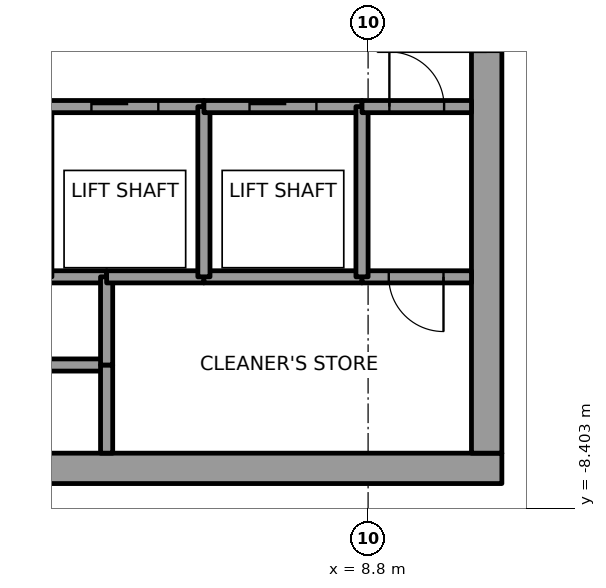
"""IFC4 building model, lengths in metres.
Left out: names, types, materials, properties, quantities, classifications, styles, units other than length and angle.
Written with IfcOpenShell. Run it as: python <this file> out.ifc"""

import sys

from ifc_helpers import new_model, si_unit, direction, frame, frame_2d, origin, place, context, subcontext, project, spatial, rectangle, extrude, element, fill, save


model = new_model("IFC4")
c1 = context("Model", 3, precision=1e-05, world=origin(), true_north=direction((0.0, 1.0)))
c2 = subcontext(c1, "Body", "Model", "MODEL_VIEW")
j1 = project(units=[si_unit("LENGTHUNIT", "METRE"), si_unit("PLANEANGLEUNIT", "RADIAN")], contexts=[c1])
p1 = place(None, origin())
s1 = spatial("IfcSite", under=j1, at=p1, CompositionType="ELEMENT")
p2 = place(p1, origin())
s2 = spatial("IfcBuilding", under=s1, at=p2, CompositionType="ELEMENT")
p3 = place(p2, frame((0.0, 0.0, 339.4)))
s3 = spatial("IfcBuildingStorey", under=s2, at=p3, CompositionType="ELEMENT", Elevation=339.4)
p4 = place(p3, frame((-11.0, -7.75, 0.0), z_axis=(0.0, 0.0, 1.0), x_axis=(1.0, 0.0, 0.0)))
e1 = element("IfcWall", 1, at=p4, inside=s3, PredefinedType="SHEAR", context=c2, shape_type="SweptSolid", body=[
    extrude(rectangle(XDim=22.0, YDim=0.5, at=frame_2d((11.0, 0.0))), origin(), (0.0, 0.0, 1.0), 5.4),
])
p5 = place(p4, frame((10.45, 0.0, 0.0)))
e2 = element("IfcOpeningElement", 2, at=p5, cuts=e1, PredefinedType="OPENING", context=c2, shape_type="SweptSolid", body=[
    extrude(rectangle(XDim=1.1, YDim=2.1, at=frame_2d((0.55, 1.05))), frame((0.0, 0.25, 0.0), z_axis=(0.0, -1.0, 0.0), x_axis=(1.0, 0.0, 0.0)), (0.0, 0.0, 1.0), 0.5),
])
p6 = place(p3, frame((10.75, -7.5, 0.0), z_axis=(0.0, 0.0, 1.0), x_axis=(0.0, 1.0, 0.0)))
e3 = element("IfcWall", 3, at=p6, inside=s3, PredefinedType="SHEAR", context=c2, shape_type="SweptSolid", body=[
    extrude(rectangle(XDim=15.0, YDim=0.5, at=frame_2d((7.5, 0.0))), origin(), (0.0, 0.0, 1.0), 5.4),
])
p7 = place(p6, frame((6.6, 0.0, 0.0)))
e4 = element("IfcOpeningElement", 4, at=p7, cuts=e3, PredefinedType="OPENING", context=c2, shape_type="SweptSolid", body=[
    extrude(rectangle(XDim=1.8, YDim=2.1, at=frame_2d((0.9, 1.05))), frame((0.0, 0.25, 0.0), z_axis=(0.0, -1.0, 0.0), x_axis=(1.0, 0.0, 0.0)), (0.0, 0.0, 1.0), 0.5),
])
p8 = place(p3, frame((4.5, -6.05, 0.0), z_axis=(0.0, 0.0, 1.0), x_axis=(-1.0, 0.0, 0.0)))
e5 = element("IfcWall", 5, at=p8, inside=s3, PredefinedType="SOLIDWALL", context=c2, shape_type="SweptSolid", body=[
    extrude(rectangle(XDim=3.6, YDim=0.2, at=frame_2d((1.8, 0.0))), origin(), (0.0, 0.0, 1.0), 5.25),
])
p9 = place(p3, frame((4.5, -4.6, 0.0), z_axis=(0.0, 0.0, 1.0), x_axis=(-1.0, 0.0, 0.0)))
e6 = element("IfcWall", 6, at=p9, inside=s3, PredefinedType="SOLIDWALL", context=c2, shape_type="SweptSolid", body=[
    extrude(rectangle(XDim=1.0, YDim=0.2, at=frame_2d((0.5, 0.0))), origin(), (0.0, 0.0, 1.0), 5.25),
])
p10 = place(p3, frame((3.5, -1.8, 0.0), z_axis=(0.0, 0.0, 1.0), x_axis=(1.0, 0.0, 0.0)))
e7 = element("IfcWall", 7, at=p10, inside=s3, PredefinedType="SOLIDWALL", context=c2, shape_type="SweptSolid", body=[
    extrude(rectangle(XDim=2.6, YDim=0.2, at=frame_2d((1.3, 0.0))), origin(), (0.0, 0.0, 1.0), 5.25),
])
p11 = place(p10, frame((0.75, 0.0, 0.0)))
e8 = element("IfcOpeningElement", 8, at=p11, cuts=e7, PredefinedType="OPENING", context=c2, shape_type="SweptSolid", body=[
    extrude(rectangle(XDim=1.1, YDim=2.1, at=frame_2d((0.55, 1.05))), frame((0.0, 0.1, 0.0), z_axis=(0.0, -1.0, 0.0), x_axis=(1.0, 0.0, 0.0)), (0.0, 0.0, 1.0), 0.2),
])
for number, where, z_axis, x_axis in (
    (9, (4.5, -6.05, 0.0), (0.0, 0.0, 1.0), (0.0, -1.0, 0.0)),
    (10, (4.5, -4.6, 0.0), (0.0, 0.0, 1.0), (0.0, -1.0, 0.0)),
):
    element("IfcWall", number, at=place(p3, frame(where, z_axis=z_axis, x_axis=x_axis)), inside=s3, PredefinedType="SOLIDWALL", context=c2, shape_type="SweptSolid", body=[
        extrude(rectangle(XDim=1.45, YDim=0.2, at=frame_2d((0.725, 0.0))), origin(), (0.0, 0.0, 1.0), 5.25),
    ])
p12 = place(p3, frame((6.1, -4.6, 0.0), z_axis=(0.0, 0.0, 1.0), x_axis=(-1.0, 0.0, 0.0)))
e11 = element("IfcWall", 11, at=p12, inside=s3, PredefinedType="SOLIDWALL", context=c2, shape_type="SweptSolid", body=[
    extrude(rectangle(XDim=1.6, YDim=0.2, at=frame_2d((0.8, 0.0))), origin(), (0.0, 0.0, 1.0), 5.25),
])
p13 = place(p3, frame((8.7, -4.6, 0.0), z_axis=(0.0, 0.0, 1.0), x_axis=(-1.0, 0.0, 0.0)))
e12 = element("IfcWall", 12, at=p13, inside=s3, PredefinedType="SOLIDWALL", context=c2, shape_type="SweptSolid", body=[
    extrude(rectangle(XDim=2.6, YDim=0.2, at=frame_2d((1.3, 0.0))), origin(), (0.0, 0.0, 1.0), 5.25),
])
p14 = place(p3, frame((6.1, -4.6, 0.0), z_axis=(0.0, 0.0, 1.0), x_axis=(0.0, 1.0, 0.0)))
e13 = element("IfcWall", 13, at=p14, inside=s3, PredefinedType="SOLIDWALL", context=c2, shape_type="SweptSolid", body=[
    extrude(rectangle(XDim=2.8, YDim=0.2, at=frame_2d((1.4, 0.0))), origin(), (0.0, 0.0, 1.0), 5.25),
])
p15 = place(p3, frame((6.1, -1.8, 0.0), z_axis=(0.0, 0.0, 1.0), x_axis=(1.0, 0.0, 0.0)))
e14 = element("IfcWall", 14, at=p15, inside=s3, PredefinedType="SOLIDWALL", context=c2, shape_type="SweptSolid", body=[
    extrude(rectangle(XDim=2.6, YDim=0.2, at=frame_2d((1.3, 0.0))), origin(), (0.0, 0.0, 1.0), 5.25),
])
p16 = place(p15, frame((0.75, 0.0, 0.0)))
e15 = element("IfcOpeningElement", 15, at=p16, cuts=e14, PredefinedType="OPENING", context=c2, shape_type="SweptSolid", body=[
    extrude(rectangle(XDim=1.1, YDim=2.1, at=frame_2d((0.55, 1.05))), frame((0.0, 0.1, 0.0), z_axis=(0.0, -1.0, 0.0), x_axis=(1.0, 0.0, 0.0)), (0.0, 0.0, 1.0), 0.2),
])
p17 = place(p3, frame((10.5, -4.6, 0.0), z_axis=(0.0, 0.0, 1.0), x_axis=(-1.0, 0.0, 0.0)))
e16 = element("IfcWall", 16, at=p17, inside=s3, PredefinedType="SOLIDWALL", context=c2, shape_type="SweptSolid", body=[
    extrude(rectangle(XDim=1.8, YDim=0.2, at=frame_2d((0.9, 0.0))), origin(), (0.0, 0.0, 1.0), 5.25),
])
p18 = place(p17, frame((0.46, 0.0, 0.0)))
e17 = element("IfcOpeningElement", 17, at=p18, cuts=e16, PredefinedType="OPENING", context=c2, shape_type="SweptSolid", body=[
    extrude(rectangle(XDim=0.9, YDim=2.1, at=frame_2d((0.45, 1.05))), frame((0.0, 0.1, 0.0), z_axis=(0.0, -1.0, 0.0), x_axis=(1.0, 0.0, 0.0)), (0.0, 0.0, 1.0), 0.2),
])
p19 = place(p3, frame((8.7, -1.8, 0.0), z_axis=(0.0, 0.0, 1.0), x_axis=(0.0, -1.0, 0.0)))
e18 = element("IfcWall", 18, at=p19, inside=s3, PredefinedType="SOLIDWALL", context=c2, shape_type="SweptSolid", body=[
    extrude(rectangle(XDim=2.8, YDim=0.2, at=frame_2d((1.4, 0.0))), origin(), (0.0, 0.0, 1.0), 5.25),
])
p20 = place(p3, frame((8.7, -1.8, 0.0), z_axis=(0.0, 0.0, 1.0), x_axis=(1.0, 0.0, 0.0)))
e19 = element("IfcWall", 19, at=p20, inside=s3, PredefinedType="SOLIDWALL", context=c2, shape_type="SweptSolid", body=[
    extrude(rectangle(XDim=1.8, YDim=0.2, at=frame_2d((0.9, 0.0))), origin(), (0.0, 0.0, 1.0), 5.25),
])
p21 = place(p20, frame((0.45, 0.0, 0.0)))
e20 = element("IfcOpeningElement", 20, at=p21, cuts=e19, PredefinedType="OPENING", context=c2, shape_type="SweptSolid", body=[
    extrude(rectangle(XDim=0.9, YDim=2.1, at=frame_2d((0.45, 1.05))), frame((0.0, 0.1, 0.0), z_axis=(0.0, -1.0, 0.0), x_axis=(1.0, 0.0, 0.0)), (0.0, 0.0, 1.0), 0.2),
])
p22 = place(p11, origin())
e21 = element("IfcDoor", 21, at=p22, inside=s3, OperationType="SLIDING_TO_RIGHT", PredefinedType="DOOR", context=c2, shape_type="SweptSolid", body=[
    extrude(rectangle(XDim=1.1, YDim=2.1, at=frame_2d((0.55, 1.05))), frame((0.0, 0.025, 0.0), z_axis=(0.0, -1.0, 0.0), x_axis=(1.0, 0.0, 0.0)), (0.0, 0.0, 1.0), 0.05),
])
fill(e8, e21)
p23 = place(p16, origin())
e22 = element("IfcDoor", 22, at=p23, inside=s3, OperationType="SLIDING_TO_RIGHT", PredefinedType="DOOR", context=c2, shape_type="SweptSolid", body=[
    extrude(rectangle(XDim=1.1, YDim=2.1, at=frame_2d((0.55, 1.05))), frame((0.0, 0.025, 0.0), z_axis=(0.0, -1.0, 0.0), x_axis=(1.0, 0.0, 0.0)), (0.0, 0.0, 1.0), 0.05),
])
fill(e15, e22)
p24 = place(p18, origin())
e23 = element("IfcDoor", 23, at=p24, inside=s3, OperationType="SINGLE_SWING_LEFT", PredefinedType="DOOR", context=c2, shape_type="SweptSolid", body=[
    extrude(rectangle(XDim=0.9, YDim=2.1, at=frame_2d((0.45, 1.05))), frame((0.0, 0.025, 0.0), z_axis=(0.0, -1.0, 0.0), x_axis=(1.0, 0.0, 0.0)), (0.0, 0.0, 1.0), 0.05),
])
fill(e17, e23)
p25 = place(p21, origin())
e24 = element("IfcDoor", 24, at=p25, inside=s3, OperationType="SINGLE_SWING_RIGHT", PredefinedType="DOOR", context=c2, shape_type="SweptSolid", body=[
    extrude(rectangle(XDim=0.9, YDim=2.1, at=frame_2d((0.45, 1.05))), frame((0.0, 0.025, 0.0), z_axis=(0.0, -1.0, 0.0), x_axis=(1.0, 0.0, 0.0)), (0.0, 0.0, 1.0), 0.05),
])
fill(e20, e24)
p26 = place(p7, origin())
e25 = element("IfcDoor", 25, at=p26, inside=s3, OperationType="DOUBLE_DOOR_SINGLE_SWING", PredefinedType="DOOR", context=c2, shape_type="SweptSolid", body=[
    extrude(rectangle(XDim=1.8, YDim=2.1, at=frame_2d((0.9, 1.05))), frame((0.0, 0.025, 0.0), z_axis=(0.0, -1.0, 0.0), x_axis=(1.0, 0.0, 0.0)), (0.0, 0.0, 1.0), 0.05),
])
fill(e4, e25)
save(model, sys.argv[1])
